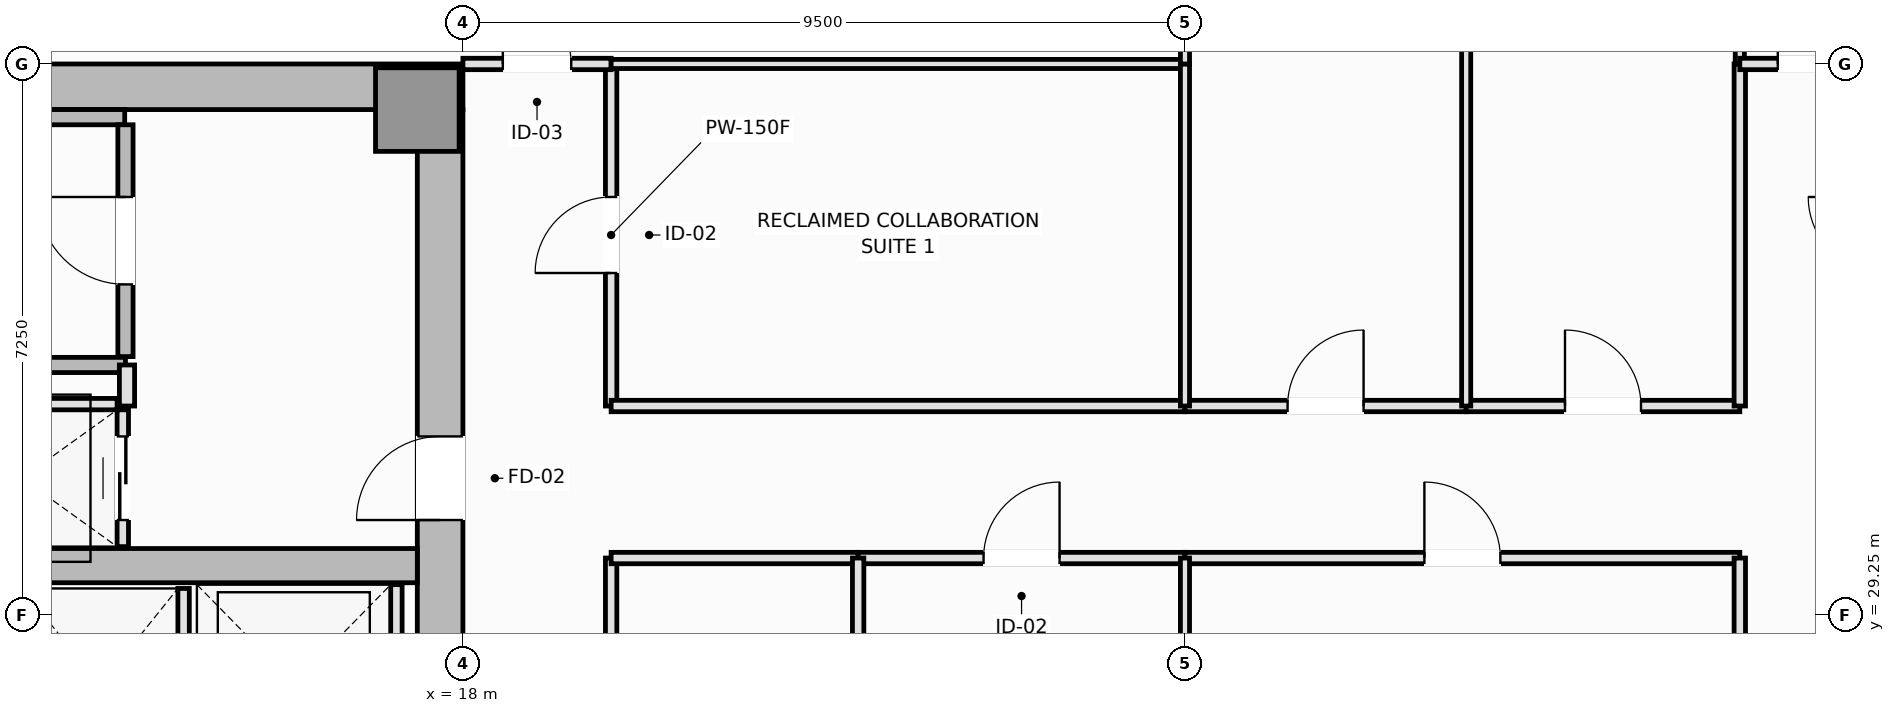
"""IFC4 building model, lengths in metres.
Left out: names, types, materials, properties, quantities, classifications, styles, units other than length and angle.
Written with IfcOpenShell. Run it as: python <this file> out.ifc"""

import sys

from ifc_helpers import new_model, si_unit, direction, frame, frame_2d, origin, origin_2d, place, context, subcontext, project, spatial, rectangle, extrude, element, fill, save


model = new_model("IFC4")
c1 = context("Model", 3, precision=1e-05, world=origin(), true_north=direction((0.0, 1.0)))
c2 = subcontext(c1, "Body", "Model", "MODEL_VIEW")
j1 = project(units=[si_unit("LENGTHUNIT", "METRE"), si_unit("PLANEANGLEUNIT", "RADIAN")], contexts=[c1])
p1 = place(None, origin())
s1 = spatial("IfcSite", under=j1, at=p1, CompositionType="ELEMENT")
p2 = place(p1, origin())
s2 = spatial("IfcBuilding", under=s1, at=p2, CompositionType="ELEMENT")
p3 = place(p2, frame((0.0, 0.0, 148.4)))
s3 = spatial("IfcBuildingStorey", under=s2, at=p3, CompositionType="ELEMENT", Elevation=148.4)
p4 = place(p3, frame((4.5, 36.2, 0.0), z_axis=(0.0, 0.0, 1.0), x_axis=(1.0, 0.0, 0.0)))
e1 = element("IfcWall", 1, at=p4, inside=s3, PredefinedType="SHEAR", context=c2, shape_type="SweptSolid", body=[
    extrude(rectangle(XDim=13.5, YDim=0.6, at=frame_2d((6.75, 0.0))), origin(), (0.0, 0.0, 1.0), 3.55),
])
p5 = place(p3, frame((17.7, 27.05, 0.0), z_axis=(0.0, 0.0, 1.0), x_axis=(0.0, 1.0, 0.0)))
e2 = element("IfcWall", 2, at=p5, inside=s3, PredefinedType="SHEAR", context=c2, shape_type="SweptSolid", body=[
    extrude(rectangle(XDim=8.85, YDim=0.6, at=frame_2d((4.425, 0.0))), origin(), (0.0, 0.0, 1.0), 3.55),
])
p6 = place(p5, frame((3.45, 0.0, 0.0)))
e3 = element("IfcOpeningElement", 3, at=p6, cuts=e2, PredefinedType="OPENING", context=c2, shape_type="SweptSolid", body=[
    extrude(rectangle(XDim=1.1, YDim=2.15, at=frame_2d((0.55, 1.075))), frame((0.0, 0.31, 0.0), z_axis=(0.0, -1.0, 0.0), x_axis=(1.0, 0.0, 0.0)), (0.0, 0.0, 1.0), 0.62),
])
p7 = place(p3, frame((5.1, 29.9, 0.0), z_axis=(0.0, 0.0, 1.0), x_axis=(1.0, 0.0, 0.0)))
e4 = element("IfcWall", 4, at=p7, inside=s3, PredefinedType="SHEAR", context=c2, shape_type="SweptSolid", body=[
    extrude(rectangle(XDim=12.3, YDim=0.45, at=frame_2d((6.15, 0.0))), origin(), (0.0, 0.0, 1.0), 3.55),
])
p8 = place(p3, frame((17.4, 35.9, 0.0), z_axis=(0.0, 0.0, 1.0), x_axis=(1.0, 0.0, 0.0)))
e5 = element("IfcColumn", 5, at=p8, inside=s3, PredefinedType="PILASTER", context=c2, shape_type="SweptSolid", body=[
    extrude(rectangle(XDim=1.1, YDim=1.1, at=origin_2d()), origin(), (0.0, 0.0, 1.0), 3.55),
])
p9 = place(p3, frame((5.8, 35.8, 0.0), z_axis=(0.0, 0.0, 1.0), x_axis=(1.0, 0.0, 0.0)))
e6 = element("IfcWall", 6, at=p9, inside=s3, PredefinedType="SOLIDWALL", context=c2, shape_type="SweptSolid", body=[
    extrude(rectangle(XDim=7.75, YDim=0.2, at=frame_2d((3.875, 0.0))), origin(), (0.0, 0.0, 1.0), 3.55),
])
p10 = place(p3, frame((5.9, 32.54, 0.0), z_axis=(0.0, 0.0, 1.0), x_axis=(1.0, 0.0, 0.0)))
e7 = element("IfcWall", 7, at=p10, inside=s3, PredefinedType="SOLIDWALL", context=c2, shape_type="SweptSolid", body=[
    extrude(rectangle(XDim=7.66, YDim=0.2, at=frame_2d((3.83, 0.0))), origin(), (0.0, 0.0, 1.0), 3.55),
])
p11 = place(p3, frame((13.56, 32.65, 0.0), z_axis=(0.0, 0.0, 1.0), x_axis=(0.0, 1.0, 0.0)))
e8 = element("IfcWall", 8, at=p11, inside=s3, PredefinedType="SOLIDWALL", context=c2, shape_type="SweptSolid", body=[
    extrude(rectangle(XDim=3.05, YDim=0.2, at=frame_2d((1.525, 0.0))), origin(), (0.0, 0.0, 1.0), 3.55),
])
p12 = place(p11, frame((0.95, 0.0, 0.0)))
e9 = element("IfcOpeningElement", 9, at=p12, cuts=e8, PredefinedType="OPENING", context=c2, shape_type="SweptSolid", body=[
    extrude(rectangle(XDim=1.15, YDim=2.15, at=frame_2d((0.575, 1.075))), frame((0.0, 0.11, 0.0), z_axis=(0.0, -1.0, 0.0), x_axis=(1.0, 0.0, 0.0)), (0.0, 0.0, 1.0), 0.22),
])
p13 = place(p3, frame((14.325, 27.05, 0.0), z_axis=(0.0, 0.0, 1.0), x_axis=(0.0, 1.0, 0.0)))
e10 = element("IfcWall", 10, at=p13, inside=s3, PredefinedType="PARTITIONING", context=c2, shape_type="SweptSolid", body=[
    extrude(rectangle(XDim=2.55, YDim=0.15, at=frame_2d((1.275, 0.0))), origin(), (0.0, 0.0, 1.0), 3.37),
])
p14 = place(p3, frame((17.125, 27.05, 0.0), z_axis=(0.0, 0.0, 1.0), x_axis=(0.0, 1.0, 0.0)))
e11 = element("IfcWall", 11, at=p14, inside=s3, PredefinedType="PARTITIONING", context=c2, shape_type="SweptSolid", body=[
    extrude(rectangle(XDim=2.6, YDim=0.15, at=frame_2d((1.3, 0.0))), origin(), (0.0, 0.0, 1.0), 3.37),
])
p15 = place(p3, frame((10.95, 32.025, 0.0), z_axis=(0.0, 0.0, 1.0), x_axis=(1.0, 0.0, 0.0)))
e12 = element("IfcWall", 12, at=p15, inside=s3, PredefinedType="PARTITIONING", context=c2, shape_type="SweptSolid", body=[
    extrude(rectangle(XDim=2.5, YDim=0.15, at=frame_2d((1.25, 0.0))), origin(), (0.0, 0.0, 1.0), 3.37),
])
p16 = place(p3, frame((13.525, 30.15, 0.0), z_axis=(0.0, 0.0, 1.0), x_axis=(0.0, 1.0, 0.0)))
e13 = element("IfcWall", 13, at=p16, inside=s3, PredefinedType="PARTITIONING", context=c2, shape_type="SweptSolid", body=[
    extrude(rectangle(XDim=1.8, YDim=0.15, at=frame_2d((0.9, 0.0))), origin(), (0.0, 0.0, 1.0), 3.37),
])
p17 = place(p16, frame((0.35, 0.0, 0.0)))
e14 = element("IfcOpeningElement", 14, at=p17, cuts=e13, PredefinedType="OPENING", context=c2, shape_type="SweptSolid", body=[
    extrude(rectangle(XDim=1.1, YDim=2.2, at=frame_2d((0.55, 1.1))), frame((0.0, 0.085, 0.0), z_axis=(0.0, -1.0, 0.0), x_axis=(1.0, 0.0, 0.0)), (0.0, 0.0, 1.0), 0.17),
])
p18 = place(p3, frame((13.58, 32.0, 0.0), z_axis=(0.0, 0.0, 1.0), x_axis=(0.0, 1.0, 0.0)))
e15 = element("IfcWall", 15, at=p18, inside=s3, PredefinedType="PARTITIONING", context=c2, shape_type="SweptSolid", body=[
    extrude(rectangle(XDim=0.54, YDim=0.2, at=frame_2d((0.27, 0.0))), origin(), (0.0, 0.0, 1.0), 3.37),
])
p19 = place(p3, frame((19.95, 27.0, 0.0), z_axis=(0.0, 0.0, 1.0), x_axis=(0.0, 1.0, 0.0)))
e16 = element("IfcWall", 16, at=p19, inside=s3, PredefinedType="PLUMBINGWALL", context=c2, shape_type="SweptSolid", body=[
    extrude(rectangle(XDim=3.0, YDim=0.15, at=frame_2d((1.5, 0.0))), origin(), (0.0, 0.0, 1.0), 3.37),
])
p20 = place(p19, frame((1.05, 0.0, 0.0)))
e17 = element("IfcOpeningElement", 17, at=p20, cuts=e16, PredefinedType="OPENING", context=c2, shape_type="SweptSolid", body=[
    extrude(rectangle(XDim=0.9, YDim=2.1, at=frame_2d((0.45, 1.05))), frame((0.0, 0.085, 0.0), z_axis=(0.0, -1.0, 0.0), x_axis=(1.0, 0.0, 0.0)), (0.0, 0.0, 1.0), 0.17),
])
p21 = place(p3, frame((19.95, 32.0, 0.0), z_axis=(0.0, 0.0, 1.0), x_axis=(0.0, 1.0, 0.0)))
e18 = element("IfcWall", 18, at=p21, inside=s3, PredefinedType="PARTITIONING", context=c2, shape_type="SweptSolid", body=[
    extrude(rectangle(XDim=4.5, YDim=0.15, at=frame_2d((2.25, 0.0))), origin(), (0.0, 0.0, 1.0), 3.37),
])
p22 = place(p21, frame((1.75, 0.0, 0.0)))
e19 = element("IfcOpeningElement", 19, at=p22, cuts=e18, PredefinedType="OPENING", context=c2, shape_type="SweptSolid", body=[
    extrude(rectangle(XDim=1.0, YDim=2.15, at=frame_2d((0.5, 1.075))), frame((0.0, 0.085, 0.0), z_axis=(0.0, -1.0, 0.0), x_axis=(1.0, 0.0, 0.0)), (0.0, 0.0, 1.0), 0.17),
])
p23 = place(p3, frame((18.0, 36.5, 0.0), z_axis=(0.0, 0.0, 1.0), x_axis=(1.0, 0.0, 0.0)))
e20 = element("IfcWall", 20, at=p23, inside=s3, PredefinedType="PARTITIONING", context=c2, shape_type="SweptSolid", body=[
    extrude(rectangle(XDim=1.95, YDim=0.15, at=frame_2d((0.975, 0.0))), origin(), (0.0, 0.0, 1.0), 3.37),
])
p24 = place(p23, frame((0.525, 0.0, 0.0)))
e21 = element("IfcOpeningElement", 21, at=p24, cuts=e20, PredefinedType="OPENING", context=c2, shape_type="SweptSolid", body=[
    extrude(rectangle(XDim=0.9, YDim=2.1, at=frame_2d((0.45, 1.05))), frame((0.0, 0.085, 0.0), z_axis=(0.0, -1.0, 0.0), x_axis=(1.0, 0.0, 0.0)), (0.0, 0.0, 1.0), 0.17),
])
p25 = place(p3, frame((19.95, 30.0, 0.0), z_axis=(0.0, 0.0, 1.0), x_axis=(1.0, 0.0, 0.0)))
e22 = element("IfcWall", 22, at=p25, inside=s3, PredefinedType="PLUMBINGWALL", context=c2, shape_type="SweptSolid", body=[
    extrude(rectangle(XDim=3.25, YDim=0.15, at=frame_2d((1.625, 0.0))), origin(), (0.0, 0.0, 1.0), 3.37),
])
p26 = place(p3, frame((23.2, 30.0, 0.0), z_axis=(0.0, 0.0, 1.0), x_axis=(1.0, 0.0, 0.0)))
e23 = element("IfcWall", 23, at=p26, inside=s3, PredefinedType="PARTITIONING", context=c2, shape_type="SweptSolid", body=[
    extrude(rectangle(XDim=4.3, YDim=0.15, at=frame_2d((2.15, 0.0))), origin(), (0.0, 0.0, 1.0), 3.37),
])
p27 = place(p26, frame((1.65, 0.0, 0.0)))
e24 = element("IfcOpeningElement", 24, at=p27, cuts=e23, PredefinedType="OPENING", context=c2, shape_type="SweptSolid", body=[
    extrude(rectangle(XDim=1.0, YDim=2.15, at=frame_2d((0.5, 1.075))), frame((0.0, 0.085, 0.0), z_axis=(0.0, -1.0, 0.0), x_axis=(1.0, 0.0, 0.0)), (0.0, 0.0, 1.0), 0.17),
])
p28 = place(p3, frame((19.95, 32.0, 0.0), z_axis=(0.0, 0.0, 1.0), x_axis=(1.0, 0.0, 0.0)))
e25 = element("IfcWall", 25, at=p28, inside=s3, PredefinedType="PARTITIONING", context=c2, shape_type="SweptSolid", body=[
    extrude(rectangle(XDim=7.55, YDim=0.15, at=frame_2d((3.775, 0.0))), origin(), (0.0, 0.0, 1.0), 2.77),
])
p29 = place(p3, frame((27.5, 30.0, 0.0), z_axis=(0.0, 0.0, 1.0), x_axis=(1.0, 0.0, 0.0)))
e26 = element("IfcWall", 26, at=p29, inside=s3, PredefinedType="PARTITIONING", context=c2, shape_type="SweptSolid", body=[
    extrude(rectangle(XDim=7.3, YDim=0.15, at=frame_2d((3.65, 0.0))), origin(), (0.0, 0.0, 1.0), 3.37),
])
p30 = place(p29, frame((3.15, 0.0, 0.0)))
e27 = element("IfcOpeningElement", 27, at=p30, cuts=e26, PredefinedType="OPENING", context=c2, shape_type="SweptSolid", body=[
    extrude(rectangle(XDim=1.0, YDim=2.15, at=frame_2d((0.5, 1.075))), frame((0.0, 0.085, 0.0), z_axis=(0.0, -1.0, 0.0), x_axis=(1.0, 0.0, 0.0)), (0.0, 0.0, 1.0), 0.17),
])
p31 = place(p3, frame((27.5, 32.0, 0.0), z_axis=(0.0, 0.0, 1.0), x_axis=(1.0, 0.0, 0.0)))
e28 = element("IfcWall", 28, at=p31, inside=s3, PredefinedType="PARTITIONING", context=c2, shape_type="SweptSolid", body=[
    extrude(rectangle(XDim=3.7, YDim=0.15, at=frame_2d((1.85, 0.0))), origin(), (0.0, 0.0, 1.0), 2.77),
])
p32 = place(p31, frame((1.35, 0.0, 0.0)))
e29 = element("IfcOpeningElement", 29, at=p32, cuts=e28, PredefinedType="OPENING", context=c2, shape_type="SweptSolid", body=[
    extrude(rectangle(XDim=1.0, YDim=2.15, at=frame_2d((0.5, 1.075))), frame((0.0, 0.085, 0.0), z_axis=(0.0, -1.0, 0.0), x_axis=(1.0, 0.0, 0.0)), (0.0, 0.0, 1.0), 0.17),
])
p33 = place(p3, frame((31.2, 32.0, 0.0), z_axis=(0.0, 0.0, 1.0), x_axis=(1.0, 0.0, 0.0)))
e30 = element("IfcWall", 30, at=p33, inside=s3, PredefinedType="PARTITIONING", context=c2, shape_type="SweptSolid", body=[
    extrude(rectangle(XDim=3.6, YDim=0.15, at=frame_2d((1.8, 0.0))), origin(), (0.0, 0.0, 1.0), 2.77),
])
p34 = place(p33, frame((1.3, 0.0, 0.0)))
e31 = element("IfcOpeningElement", 31, at=p34, cuts=e30, PredefinedType="OPENING", context=c2, shape_type="SweptSolid", body=[
    extrude(rectangle(XDim=1.0, YDim=2.15, at=frame_2d((0.5, 1.075))), frame((0.0, 0.085, 0.0), z_axis=(0.0, -1.0, 0.0), x_axis=(1.0, 0.0, 0.0)), (0.0, 0.0, 1.0), 0.17),
])
p35 = place(p3, frame((23.2, 27.0, 0.0), z_axis=(0.0, 0.0, 1.0), x_axis=(0.0, 1.0, 0.0)))
e32 = element("IfcWall", 32, at=p35, inside=s3, PredefinedType="PLUMBINGWALL", context=c2, shape_type="SweptSolid", body=[
    extrude(rectangle(XDim=3.0, YDim=0.15, at=frame_2d((1.5, 0.0))), origin(), (0.0, 0.0, 1.0), 3.37),
])
p36 = place(p3, frame((27.5, 27.0, 0.0), z_axis=(0.0, 0.0, 1.0), x_axis=(0.0, 1.0, 0.0)))
e33 = element("IfcWall", 33, at=p36, inside=s3, PredefinedType="PARTITIONING", context=c2, shape_type="SweptSolid", body=[
    extrude(rectangle(XDim=3.0, YDim=0.12, at=frame_2d((1.5, 0.0))), origin(), (0.0, 0.0, 1.0), 3.37),
])
p37 = place(p3, frame((19.95, 36.5, 0.0), z_axis=(0.0, 0.0, 1.0), x_axis=(1.0, 0.0, 0.0)))
e34 = element("IfcWall", 34, at=p37, inside=s3, PredefinedType="PARTITIONING", context=c2, shape_type="SweptSolid", body=[
    extrude(rectangle(XDim=7.55, YDim=0.12, at=frame_2d((3.775, 0.0))), origin(), (0.0, 0.0, 1.0), 3.37),
])
p38 = place(p3, frame((27.5, 32.0, 0.0), z_axis=(0.0, 0.0, 1.0), x_axis=(0.0, 1.0, 0.0)))
e35 = element("IfcWall", 35, at=p38, inside=s3, PredefinedType="PARTITIONING", context=c2, shape_type="SweptSolid", body=[
    extrude(rectangle(XDim=4.5, YDim=0.12, at=frame_2d((2.25, 0.0))), origin(), (0.0, 0.0, 1.0), 3.37),
])
p39 = place(p3, frame((34.8, 14.0, 0.0), z_axis=(0.0, 0.0, 1.0), x_axis=(0.0, 1.0, 0.0)))
e36 = element("IfcWall", 36, at=p39, inside=s3, PredefinedType="PARTITIONING", context=c2, shape_type="SweptSolid", body=[
    extrude(rectangle(XDim=16.0, YDim=0.15, at=frame_2d((8.0, 0.0))), origin(), (0.0, 0.0, 1.0), 3.37),
])
p40 = place(p3, frame((27.5, 36.5, 0.0), z_axis=(0.0, 0.0, 1.0), x_axis=(0.0, 1.0, 0.0)))
e37 = element("IfcWall", 37, at=p40, inside=s3, PredefinedType="PARTITIONING", context=c2, shape_type="SweptSolid", body=[
    extrude(rectangle(XDim=9.99, YDim=0.12, at=frame_2d((4.995, 0.0))), origin(), (0.0, 0.0, 1.0), 2.87),
])
p41 = place(p3, frame((31.2, 32.0, 0.0), z_axis=(0.0, 0.0, 1.0), x_axis=(0.0, 1.0, 0.0)))
e38 = element("IfcWall", 38, at=p41, inside=s3, PredefinedType="PARTITIONING", context=c2, shape_type="SweptSolid", body=[
    extrude(rectangle(XDim=14.49, YDim=0.12, at=frame_2d((7.245, 0.0))), origin(), (0.0, 0.0, 1.0), 3.37),
])
p42 = place(p3, frame((34.8, 32.0, 0.0), z_axis=(0.0, 0.0, 1.0), x_axis=(0.0, 1.0, 0.0)))
e39 = element("IfcWall", 39, at=p42, inside=s3, PredefinedType="PARTITIONING", context=c2, shape_type="SweptSolid", body=[
    extrude(rectangle(XDim=4.5, YDim=0.15, at=frame_2d((2.25, 0.0))), origin(), (0.0, 0.0, 1.0), 3.37),
])
p43 = place(p3, frame((34.8, 36.5, 0.0), z_axis=(0.0, 0.0, 1.0), x_axis=(0.0, 1.0, 0.0)))
e40 = element("IfcWall", 40, at=p43, inside=s3, PredefinedType="PARTITIONING", context=c2, shape_type="SweptSolid", body=[
    extrude(rectangle(XDim=9.99, YDim=0.12, at=frame_2d((4.995, 0.0))), origin(), (0.0, 0.0, 1.0), 3.37),
])
p44 = place(p3, frame((34.8, 36.5, 0.0), z_axis=(0.0, 0.0, 1.0), x_axis=(1.0, 0.0, 0.0)))
e41 = element("IfcWall", 41, at=p44, inside=s3, PredefinedType="PARTITIONING", context=c2, shape_type="SweptSolid", body=[
    extrude(rectangle(XDim=1.9, YDim=0.15, at=frame_2d((0.95, 0.0))), origin(), (0.0, 0.0, 1.0), 3.37),
])
p45 = place(p44, frame((0.5, 0.0, 0.0)))
e42 = element("IfcOpeningElement", 42, at=p45, cuts=e41, PredefinedType="OPENING", context=c2, shape_type="SweptSolid", body=[
    extrude(rectangle(XDim=0.9, YDim=2.1, at=frame_2d((0.45, 1.05))), frame((0.0, 0.085, 0.0), z_axis=(0.0, -1.0, 0.0), x_axis=(1.0, 0.0, 0.0)), (0.0, 0.0, 1.0), 0.17),
])
p46 = place(p12, origin())
e43 = element("IfcDoor", 43, at=p46, inside=s3, OperationType="SINGLE_SWING_RIGHT", PredefinedType="DOOR", context=c2, shape_type="SweptSolid", body=[
    extrude(rectangle(XDim=1.15, YDim=2.15, at=frame_2d((0.575, 1.075))), frame((0.0, 0.025, 0.0), z_axis=(0.0, -1.0, 0.0), x_axis=(1.0, 0.0, 0.0)), (0.0, 0.0, 1.0), 0.05),
])
fill(e9, e43)
p47 = place(p17, origin())
e44 = element("IfcDoor", 44, at=p47, inside=s3, OperationType="DOUBLE_DOOR_SLIDING", PredefinedType="DOOR", context=c2, shape_type="SweptSolid", body=[
    extrude(rectangle(XDim=1.1, YDim=2.2, at=frame_2d((0.55, 1.1))), frame((0.0, 0.025, 0.0), z_axis=(0.0, -1.0, 0.0), x_axis=(1.0, 0.0, 0.0)), (0.0, 0.0, 1.0), 0.05),
])
fill(e14, e44)
p48 = place(p6, origin())
e45 = element("IfcDoor", 45, at=p48, inside=s3, OperationType="SINGLE_SWING_LEFT", PredefinedType="DOOR", context=c2, shape_type="SweptSolid", body=[
    extrude(rectangle(XDim=1.1, YDim=2.15, at=frame_2d((0.55, 1.075))), frame((0.0, 0.025, 0.0), z_axis=(0.0, -1.0, 0.0), x_axis=(1.0, 0.0, 0.0)), (0.0, 0.0, 1.0), 0.05),
])
fill(e3, e45)
p49 = place(p22, origin())
e46 = element("IfcDoor", 46, at=p49, inside=s3, OperationType="SINGLE_SWING_LEFT", PredefinedType="DOOR", context=c2, shape_type="SweptSolid", body=[
    extrude(rectangle(XDim=1.0, YDim=2.15, at=frame_2d((0.5, 1.075))), frame((0.0, 0.025, 0.0), z_axis=(0.0, -1.0, 0.0), x_axis=(1.0, 0.0, 0.0)), (0.0, 0.0, 1.0), 0.05),
])
fill(e19, e46)
p50 = place(p24, origin())
e47 = element("IfcDoor", 47, at=p50, inside=s3, OperationType="SINGLE_SWING_LEFT", PredefinedType="DOOR", context=c2, shape_type="SweptSolid", body=[
    extrude(rectangle(XDim=0.9, YDim=2.1, at=frame_2d((0.45, 1.05))), frame((0.0, 0.025, 0.0), z_axis=(0.0, -1.0, 0.0), x_axis=(1.0, 0.0, 0.0)), (0.0, 0.0, 1.0), 0.05),
])
fill(e21, e47)
p51 = place(p27, origin())
e48 = element("IfcDoor", 48, at=p51, inside=s3, OperationType="SINGLE_SWING_RIGHT", PredefinedType="DOOR", context=c2, shape_type="SweptSolid", body=[
    extrude(rectangle(XDim=1.0, YDim=2.15, at=frame_2d((0.5, 1.075))), frame((0.0, 0.025, 0.0), z_axis=(0.0, -1.0, 0.0), x_axis=(1.0, 0.0, 0.0)), (0.0, 0.0, 1.0), 0.05),
])
fill(e24, e48)
p52 = place(p30, origin())
e49 = element("IfcDoor", 49, at=p52, inside=s3, OperationType="SINGLE_SWING_LEFT", PredefinedType="DOOR", context=c2, shape_type="SweptSolid", body=[
    extrude(rectangle(XDim=1.0, YDim=2.15, at=frame_2d((0.5, 1.075))), frame((0.0, 0.025, 0.0), z_axis=(0.0, -1.0, 0.0), x_axis=(1.0, 0.0, 0.0)), (0.0, 0.0, 1.0), 0.05),
])
fill(e27, e49)
p53 = place(p32, origin())
e50 = element("IfcDoor", 50, at=p53, inside=s3, OperationType="SINGLE_SWING_RIGHT", PredefinedType="DOOR", context=c2, shape_type="SweptSolid", body=[
    extrude(rectangle(XDim=1.0, YDim=2.15, at=frame_2d((0.5, 1.075))), frame((0.0, 0.025, 0.0), z_axis=(0.0, -1.0, 0.0), x_axis=(1.0, 0.0, 0.0)), (0.0, 0.0, 1.0), 0.05),
])
fill(e29, e50)
p54 = place(p34, origin())
e51 = element("IfcDoor", 51, at=p54, inside=s3, OperationType="SINGLE_SWING_LEFT", PredefinedType="DOOR", context=c2, shape_type="SweptSolid", body=[
    extrude(rectangle(XDim=1.0, YDim=2.15, at=frame_2d((0.5, 1.075))), frame((0.0, 0.025, 0.0), z_axis=(0.0, -1.0, 0.0), x_axis=(1.0, 0.0, 0.0)), (0.0, 0.0, 1.0), 0.05),
])
fill(e31, e51)
p55 = place(p45, origin())
e52 = element("IfcDoor", 52, at=p55, inside=s3, OperationType="SINGLE_SWING_LEFT", PredefinedType="DOOR", context=c2, shape_type="SweptSolid", body=[
    extrude(rectangle(XDim=0.9, YDim=2.1, at=frame_2d((0.45, 1.05))), frame((0.0, 0.025, 0.0), z_axis=(0.0, -1.0, 0.0), x_axis=(1.0, 0.0, 0.0)), (0.0, 0.0, 1.0), 0.05),
])
fill(e42, e52)
save(model, sys.argv[1])
